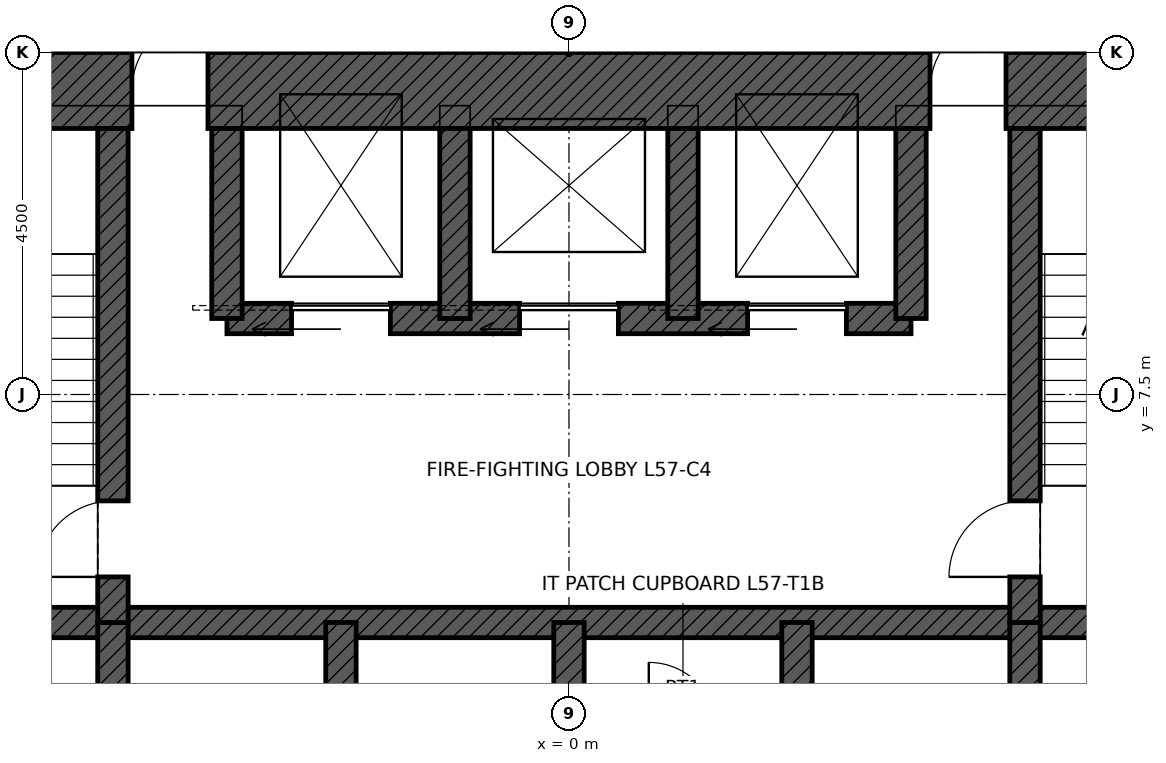
"""IFC4 building model, lengths in metres.
Left out: names, types, materials, properties, quantities, classifications, styles, units other than length and angle.
Written with IfcOpenShell. Run it as: python <this file> out.ifc"""

import sys

from ifc_helpers import new_model, si_unit, direction, frame, frame_2d, origin, place, context, subcontext, project, spatial, rectangle, extrude, element, fill, save


model = new_model("IFC4")
c1 = context("Model", 3, precision=1e-05, world=origin(), true_north=direction((0.0, 1.0)))
c2 = subcontext(c1, "Body", "Model", "MODEL_VIEW")
j1 = project(units=[si_unit("LENGTHUNIT", "METRE"), si_unit("PLANEANGLEUNIT", "RADIAN")], contexts=[c1])
p1 = place(None, origin())
s1 = spatial("IfcSite", under=j1, at=p1, CompositionType="ELEMENT")
p2 = place(p1, origin())
s2 = spatial("IfcBuilding", under=s1, at=p2, CompositionType="ELEMENT")
p3 = place(p2, frame((0.0, 0.0, 263.9)))
s3 = spatial("IfcBuildingStorey", under=s2, at=p3, CompositionType="ELEMENT", Elevation=263.9)
p4 = place(p3, frame((-12.0, 11.5, 0.0), z_axis=(0.0, 0.0, 1.0), x_axis=(1.0, 0.0, 0.0)))
e1 = element("IfcWall", 1, at=p4, inside=s3, PredefinedType="SHEAR", context=c2, shape_type="SweptSolid", body=[
    extrude(rectangle(XDim=24.0, YDim=1.0, at=frame_2d((12.0, 0.0))), origin(), (0.0, 0.0, 1.0), 4.0),
])
p5 = place(p4, frame((6.25, 0.0, 0.0)))
e2 = element("IfcOpeningElement", 2, at=p5, cuts=e1, PredefinedType="OPENING", context=c2, shape_type="SweptSolid", body=[
    extrude(rectangle(XDim=1.0, YDim=2.4, at=frame_2d((0.5, 1.2))), frame((0.0, 0.51, 0.0), z_axis=(0.0, -1.0, 0.0), x_axis=(1.0, 0.0, 0.0)), (0.0, 0.0, 1.0), 1.02),
])
p6 = place(p4, frame((16.75, 0.0, 0.0)))
e3 = element("IfcOpeningElement", 3, at=p6, cuts=e1, PredefinedType="OPENING", context=c2, shape_type="SweptSolid", body=[
    extrude(rectangle(XDim=1.0, YDim=2.4, at=frame_2d((0.5, 1.2))), frame((0.0, 0.51, 0.0), z_axis=(0.0, -1.0, 0.0), x_axis=(1.0, 0.0, 0.0)), (0.0, 0.0, 1.0), 1.02),
])
p7 = place(p3, frame((-11.0, 4.5, 0.0), z_axis=(0.0, 0.0, 1.0), x_axis=(1.0, 0.0, 0.0)))
e4 = element("IfcWall", 4, at=p7, inside=s3, PredefinedType="SHEAR", context=c2, shape_type="SweptSolid", body=[
    extrude(rectangle(XDim=22.0, YDim=0.4, at=frame_2d((11.0, 0.0))), origin(), (0.0, 0.0, 1.0), 4.0),
])
p8 = place(p7, frame((0.4, 0.0, 0.0)))
e5 = element("IfcOpeningElement", 5, at=p8, cuts=e4, PredefinedType="OPENING", context=c2, shape_type="SweptSolid", body=[
    extrude(rectangle(XDim=1.0, YDim=2.1, at=frame_2d((0.5, 1.05))), frame((0.0, 0.21, 0.0), z_axis=(0.0, -1.0, 0.0), x_axis=(1.0, 0.0, 0.0)), (0.0, 0.0, 1.0), 0.42),
])
p9 = place(p7, frame((20.6, 0.0, 0.0)))
e6 = element("IfcOpeningElement", 6, at=p9, cuts=e4, PredefinedType="OPENING", context=c2, shape_type="SweptSolid", body=[
    extrude(rectangle(XDim=1.0, YDim=2.1, at=frame_2d((0.5, 1.05))), frame((0.0, 0.21, 0.0), z_axis=(0.0, -1.0, 0.0), x_axis=(1.0, 0.0, 0.0)), (0.0, 0.0, 1.0), 0.42),
])
p10 = place(p3, frame((-4.5, 8.5, 0.0), z_axis=(0.0, 0.0, 1.0), x_axis=(1.0, 0.0, 0.0)))
e7 = element("IfcWall", 7, at=p10, inside=s3, PredefinedType="SHEAR", context=c2, shape_type="SweptSolid", body=[
    extrude(rectangle(XDim=9.0, YDim=0.4, at=frame_2d((4.5, 0.0))), origin(), (0.0, 0.0, 1.0), 4.0),
])
p11 = place(p10, frame((0.85, 0.0, 0.0)))
e8 = element("IfcOpeningElement", 8, at=p11, cuts=e7, PredefinedType="OPENING", context=c2, shape_type="SweptSolid", body=[
    extrude(rectangle(XDim=1.3, YDim=2.4, at=frame_2d((0.65, 1.2))), frame((0.0, 0.21, 0.0), z_axis=(0.0, -1.0, 0.0), x_axis=(1.0, 0.0, 0.0)), (0.0, 0.0, 1.0), 0.42),
])
p12 = place(p10, frame((6.85, 0.0, 0.0)))
e9 = element("IfcOpeningElement", 9, at=p12, cuts=e7, PredefinedType="OPENING", context=c2, shape_type="SweptSolid", body=[
    extrude(rectangle(XDim=1.3, YDim=2.4, at=frame_2d((0.65, 1.2))), frame((0.0, 0.21, 0.0), z_axis=(0.0, -1.0, 0.0), x_axis=(1.0, 0.0, 0.0)), (0.0, 0.0, 1.0), 0.42),
])
p13 = place(p10, frame((3.85, 0.0, 0.0)))
e10 = element("IfcOpeningElement", 10, at=p13, cuts=e7, PredefinedType="OPENING", context=c2, shape_type="SweptSolid", body=[
    extrude(rectangle(XDim=1.3, YDim=2.4, at=frame_2d((0.65, 1.2))), frame((0.0, 0.21, 0.0), z_axis=(0.0, -1.0, 0.0), x_axis=(1.0, 0.0, 0.0)), (0.0, 0.0, 1.0), 0.42),
])
for number, where, z_axis, x_axis in (
    (11, (-6.0, 1.5, 0.0), (0.0, 0.0, 1.0), (0.0, 1.0, 0.0)),
    (12, (-3.0, 1.5, 0.0), (0.0, 0.0, 1.0), (0.0, 1.0, 0.0)),
    (13, (0.0, 1.5, 0.0), (0.0, 0.0, 1.0), (0.0, 1.0, 0.0)),
    (14, (3.0, 1.5, 0.0), (0.0, 0.0, 1.0), (0.0, 1.0, 0.0)),
    (15, (6.0, 1.5, 0.0), (0.0, 0.0, 1.0), (0.0, 1.0, 0.0)),
):
    element("IfcWall", number, at=place(p3, frame(where, z_axis=z_axis, x_axis=x_axis)), inside=s3, PredefinedType="SHEAR", context=c2, shape_type="SweptSolid", body=[
        extrude(rectangle(XDim=3.0, YDim=0.4, at=frame_2d((1.5, 0.0))), origin(), (0.0, 0.0, 1.0), 4.0),
    ])
p14 = place(p3, frame((-6.0, 4.5, 0.0), z_axis=(0.0, 0.0, 1.0), x_axis=(0.0, 1.0, 0.0)))
e16 = element("IfcWall", 16, at=p14, inside=s3, PredefinedType="SHEAR", context=c2, shape_type="SweptSolid", body=[
    extrude(rectangle(XDim=6.5, YDim=0.4, at=frame_2d((3.25, 0.0))), origin(), (0.0, 0.0, 1.0), 4.0),
])
p15 = place(p14, frame((0.6, 0.0, 0.0)))
e17 = element("IfcOpeningElement", 17, at=p15, cuts=e16, PredefinedType="OPENING", context=c2, shape_type="SweptSolid", body=[
    extrude(rectangle(XDim=1.0, YDim=2.1, at=frame_2d((0.5, 1.05))), frame((0.0, 0.21, 0.0), z_axis=(0.0, -1.0, 0.0), x_axis=(1.0, 0.0, 0.0)), (0.0, 0.0, 1.0), 0.42),
])
p16 = place(p3, frame((6.0, 4.5, 0.0), z_axis=(0.0, 0.0, 1.0), x_axis=(0.0, 1.0, 0.0)))
e18 = element("IfcWall", 18, at=p16, inside=s3, PredefinedType="SHEAR", context=c2, shape_type="SweptSolid", body=[
    extrude(rectangle(XDim=6.5, YDim=0.4, at=frame_2d((3.25, 0.0))), origin(), (0.0, 0.0, 1.0), 4.0),
])
p17 = place(p16, frame((0.6, 0.0, 0.0)))
e19 = element("IfcOpeningElement", 19, at=p17, cuts=e18, PredefinedType="OPENING", context=c2, shape_type="SweptSolid", body=[
    extrude(rectangle(XDim=1.0, YDim=2.1, at=frame_2d((0.5, 1.05))), frame((0.0, 0.21, 0.0), z_axis=(0.0, -1.0, 0.0), x_axis=(1.0, 0.0, 0.0)), (0.0, 0.0, 1.0), 0.42),
])
for number, where, z_axis, x_axis in (
    (20, (-4.5, 8.5, 0.0), (0.0, 0.0, 1.0), (0.0, 1.0, 0.0)),
    (21, (4.5, 8.5, 0.0), (0.0, 0.0, 1.0), (0.0, 1.0, 0.0)),
    (22, (-1.5, 8.5, 0.0), (0.0, 0.0, 1.0), (0.0, 1.0, 0.0)),
    (23, (1.5, 8.5, 0.0), (0.0, 0.0, 1.0), (0.0, 1.0, 0.0)),
):
    element("IfcWall", number, at=place(p3, frame(where, z_axis=z_axis, x_axis=x_axis)), inside=s3, PredefinedType="SHEAR", context=c2, shape_type="SweptSolid", body=[
        extrude(rectangle(XDim=2.5, YDim=0.4, at=frame_2d((1.25, 0.0))), origin(), (0.0, 0.0, 1.0), 4.0),
    ])
p18 = place(p15, origin())
e24 = element("IfcDoor", 24, at=p18, inside=s3, OperationType="SINGLE_SWING_LEFT", PredefinedType="DOOR", context=c2, shape_type="SweptSolid", body=[
    extrude(rectangle(XDim=1.0, YDim=2.1, at=frame_2d((0.5, 1.05))), frame((0.0, 0.025, 0.0), z_axis=(0.0, -1.0, 0.0), x_axis=(1.0, 0.0, 0.0)), (0.0, 0.0, 1.0), 0.05),
])
fill(e17, e24)
p19 = place(p17, origin())
e25 = element("IfcDoor", 25, at=p19, inside=s3, OperationType="SINGLE_SWING_LEFT", PredefinedType="DOOR", context=c2, shape_type="SweptSolid", body=[
    extrude(rectangle(XDim=1.0, YDim=2.1, at=frame_2d((0.5, 1.05))), frame((0.0, 0.025, 0.0), z_axis=(0.0, -1.0, 0.0), x_axis=(1.0, 0.0, 0.0)), (0.0, 0.0, 1.0), 0.05),
])
fill(e19, e25)
p20 = place(p5, origin())
e26 = element("IfcDoor", 26, at=p20, inside=s3, OperationType="SINGLE_SWING_RIGHT", PredefinedType="DOOR", context=c2, shape_type="SweptSolid", body=[
    extrude(rectangle(XDim=1.0, YDim=2.4, at=frame_2d((0.5, 1.2))), frame((0.0, 0.485, 0.0), z_axis=(0.0, -1.0, 0.0), x_axis=(1.0, 0.0, 0.0)), (0.0, 0.0, 1.0), 0.05),
])
fill(e2, e26)
p21 = place(p6, origin())
e27 = element("IfcDoor", 27, at=p21, inside=s3, OperationType="SINGLE_SWING_RIGHT", PredefinedType="DOOR", context=c2, shape_type="SweptSolid", body=[
    extrude(rectangle(XDim=1.0, YDim=2.4, at=frame_2d((0.5, 1.2))), frame((0.0, 0.485, 0.0), z_axis=(0.0, -1.0, 0.0), x_axis=(1.0, 0.0, 0.0)), (0.0, 0.0, 1.0), 0.05),
])
fill(e3, e27)
p22 = place(p11, origin())
e28 = element("IfcDoor", 28, at=p22, inside=s3, OperationType="SLIDING_TO_LEFT", PredefinedType="DOOR", context=c2, shape_type="SweptSolid", body=[
    extrude(rectangle(XDim=1.3, YDim=2.4, at=frame_2d((0.65, 1.2))), frame((0.0, 0.025, 0.0), z_axis=(0.0, -1.0, 0.0), x_axis=(1.0, 0.0, 0.0)), (0.0, 0.0, 1.0), 0.05),
])
fill(e8, e28)
p23 = place(p12, origin())
e29 = element("IfcDoor", 29, at=p23, inside=s3, OperationType="SLIDING_TO_LEFT", PredefinedType="DOOR", context=c2, shape_type="SweptSolid", body=[
    extrude(rectangle(XDim=1.3, YDim=2.4, at=frame_2d((0.65, 1.2))), frame((0.0, 0.025, 0.0), z_axis=(0.0, -1.0, 0.0), x_axis=(1.0, 0.0, 0.0)), (0.0, 0.0, 1.0), 0.05),
])
fill(e9, e29)
p24 = place(p13, origin())
e30 = element("IfcDoor", 30, at=p24, inside=s3, OperationType="SLIDING_TO_LEFT", PredefinedType="DOOR", context=c2, shape_type="SweptSolid", body=[
    extrude(rectangle(XDim=1.3, YDim=2.4, at=frame_2d((0.65, 1.2))), frame((0.0, 0.025, 0.0), z_axis=(0.0, -1.0, 0.0), x_axis=(1.0, 0.0, 0.0)), (0.0, 0.0, 1.0), 0.05),
])
fill(e10, e30)
save(model, sys.argv[1])
